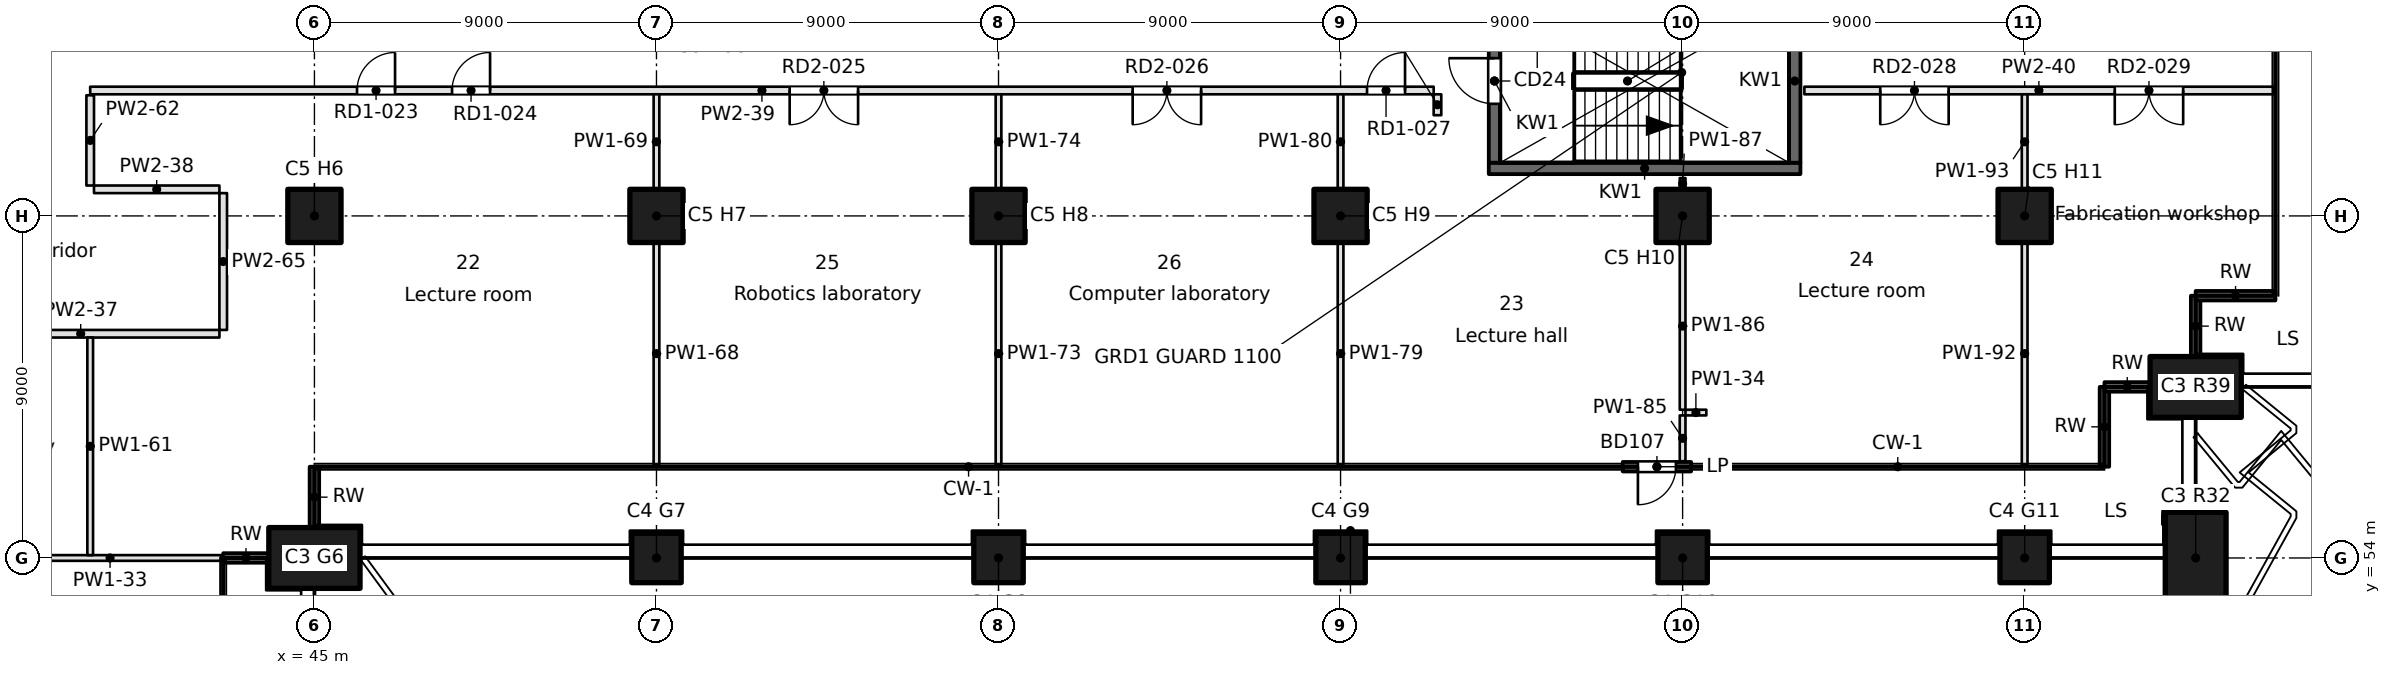
"""IFC4 building model, lengths in metres.
Left out: names, types, materials, properties, quantities, classifications, styles, units other than length and angle.
Written with IfcOpenShell. Run it as: python <this file> out.ifc"""

import sys

from ifc_helpers import new_model, si_unit, direction, frame, frame_2d, origin, origin_2d, place, context, subcontext, project, spatial, rectangle, extrude, element, fill, save


model = new_model("IFC4")
c1 = context("Model", 3, precision=1e-05, world=origin(), true_north=direction((0.0, 1.0)))
c2 = subcontext(c1, "Body", "Model", "MODEL_VIEW")
j1 = project(units=[si_unit("LENGTHUNIT", "METRE"), si_unit("PLANEANGLEUNIT", "RADIAN")], contexts=[c1])
p1 = place(None, origin())
s1 = spatial("IfcSite", under=j1, at=p1, CompositionType="ELEMENT")
p2 = place(p1, origin())
s2 = spatial("IfcBuilding", under=s1, at=p2, CompositionType="ELEMENT")
p3 = place(p2, frame((0.0, 0.0, 58.0)))
s3 = spatial("IfcBuildingStorey", under=s2, at=p3, CompositionType="ELEMENT", Elevation=58.0)
p4 = place(p3, frame((45.0, 54.0, 0.0), z_axis=(0.0, 0.0, 1.0), x_axis=(1.0, 0.0, 0.0)))
e1 = element("IfcColumn", 1, at=p4, inside=s3, PredefinedType="COLUMN", context=c2, shape_type="SweptSolid", body=[
    extrude(rectangle(XDim=2.4, YDim=1.6, at=origin_2d()), origin(), (0.0, 0.0, 1.0), 3.7),
])
for number, where, z_axis, x_axis in (
    (2, (54.0, 54.0, 0.0), (0.0, 0.0, 1.0), (1.0, 0.0, 0.0)),
    (3, (63.0, 54.0, 0.0), (0.0, 0.0, 1.0), (1.0, 0.0, 0.0)),
    (4, (72.0, 54.0, 0.0), (0.0, 0.0, 1.0), (1.0, 0.0, 0.0)),
    (5, (81.0, 54.0, 0.0), (0.0, 0.0, 1.0), (1.0, 0.0, 0.0)),
    (6, (90.0, 54.0, 0.0), (0.0, 0.0, 1.0), (1.0, 0.0, 0.0)),
):
    element("IfcColumn", number, at=place(p3, frame(where, z_axis=z_axis, x_axis=x_axis)), inside=s3, PredefinedType="COLUMN", context=c2, shape_type="SweptSolid", body=[
        extrude(rectangle(XDim=1.3, YDim=1.3, at=origin_2d()), origin(), (0.0, 0.0, 1.0), 3.7),
    ])
for number, where, z_axis, x_axis in (
    (7, (94.5, 54.0, 0.0), (0.0, 0.0, 1.0), (0.0, 1.0, 0.0)),
    (8, (94.5, 58.5, 0.0), (0.0, 0.0, 1.0), (1.0, 0.0, 0.0)),
):
    element("IfcColumn", number, at=place(p3, frame(where, z_axis=z_axis, x_axis=x_axis)), inside=s3, PredefinedType="COLUMN", context=c2, shape_type="SweptSolid", body=[
        extrude(rectangle(XDim=2.4, YDim=1.6, at=origin_2d()), origin(), (0.0, 0.0, 1.0), 3.7),
    ])
for number, where, z_axis, x_axis in (
    (9, (45.0, 63.0, 0.0), (0.0, 0.0, 1.0), (1.0, 0.0, 0.0)),
    (10, (54.0, 63.0, 0.0), (0.0, 0.0, 1.0), (1.0, 0.0, 0.0)),
    (11, (63.0, 63.0, 0.0), (0.0, 0.0, 1.0), (1.0, 0.0, 0.0)),
    (12, (72.0, 63.0, 0.0), (0.0, 0.0, 1.0), (1.0, 0.0, 0.0)),
    (13, (81.0, 63.0, 0.0), (0.0, 0.0, 1.0), (1.0, 0.0, 0.0)),
    (14, (90.0, 63.0, 0.0), (0.0, 0.0, 1.0), (1.0, 0.0, 0.0)),
):
    element("IfcColumn", number, at=place(p3, frame(where, z_axis=z_axis, x_axis=x_axis)), inside=s3, PredefinedType="COLUMN", context=c2, shape_type="SweptSolid", body=[
        extrude(rectangle(XDim=1.4, YDim=1.4, at=origin_2d()), origin(), (0.0, 0.0, 1.0), 3.7),
    ])
p5 = place(p3, frame((42.599, 54.0, 0.0), z_axis=(0.0, 0.0, 1.0), x_axis=(0.999999917344, 0.000406586671, 0.0)))
e15 = element("IfcWall", 15, at=p5, inside=s3, PredefinedType="SOLIDWALL", context=c2, shape_type="SweptSolid", body=[
    extrude(rectangle(XDim=1.201, YDim=0.25, at=frame_2d((0.601, 0.0))), origin(), (0.0, 0.0, 1.0), 3.3),
])
p6 = place(p3, frame((44.999, 54.8, 0.0), z_axis=(0.0, 0.0, 1.0), x_axis=(0.000152508767, 0.999999988371, 0.0)))
e16 = element("IfcWall", 16, at=p6, inside=s3, PredefinedType="SOLIDWALL", context=c2, shape_type="SweptSolid", body=[
    extrude(rectangle(XDim=1.601, YDim=0.25, at=frame_2d((0.8, 0.0))), origin(), (0.0, 0.0, 1.0), 3.3),
])
p7 = place(p3, frame((79.424, 56.401, 0.0), z_axis=(0.0, 0.0, 1.0), x_axis=(1.0, 0.0, 0.0)))
e17 = element("IfcWall", 17, at=p7, inside=s3, PredefinedType="SOLIDWALL", context=c2, shape_type="SweptSolid", body=[
    extrude(rectangle(XDim=1.8, YDim=0.25, at=frame_2d((0.9, 0.0))), origin(), (0.0, 0.0, 1.0), 3.3),
])
p8 = place(p7, frame((0.4, 0.0, 0.0)))
e18 = element("IfcOpeningElement", 18, at=p8, cuts=e17, PredefinedType="OPENING", context=c2, shape_type="SweptSolid", body=[
    extrude(rectangle(XDim=1.0, YDim=2.1, at=frame_2d((0.5, 1.05))), frame((0.0, 0.125, 0.0), z_axis=(0.0, -1.0, 0.0), x_axis=(1.0, 0.0, 0.0)), (0.0, 0.0, 1.0), 0.25),
])
p9 = place(p3, frame((92.099, 56.401, 0.0), z_axis=(0.0, 0.0, 1.0), x_axis=(0.00011626555, 0.999999993241, 0.0)))
e19 = element("IfcWall", 19, at=p9, inside=s3, PredefinedType="SOLIDWALL", context=c2, shape_type="SweptSolid", body=[
    extrude(rectangle(XDim=2.1, YDim=0.25, at=frame_2d((1.05, 0.0))), origin(), (0.0, 0.0, 1.0), 3.3),
])
p10 = place(p3, frame((92.099, 58.501, 0.0), z_axis=(0.0, 0.0, 1.0), x_axis=(1.0, 0.0, 0.0)))
e20 = element("IfcWall", 20, at=p10, inside=s3, PredefinedType="SOLIDWALL", context=c2, shape_type="SweptSolid", body=[
    extrude(rectangle(XDim=1.201, YDim=0.25, at=frame_2d((0.6, 0.0))), origin(), (0.0, 0.0, 1.0), 3.3),
])
p11 = place(p3, frame((94.499, 59.3, 0.0), z_axis=(0.0, 0.0, 1.0), x_axis=(0.00015253203, 0.999999988367, 0.0)))
e21 = element("IfcWall", 21, at=p11, inside=s3, PredefinedType="SOLIDWALL", context=c2, shape_type="SweptSolid", body=[
    extrude(rectangle(XDim=1.601, YDim=0.25, at=frame_2d((0.8, 0.0))), origin(), (0.0, 0.0, 1.0), 3.3),
])
p12 = place(p3, frame((94.499, 60.901, 0.0), z_axis=(0.0, 0.0, 1.0), x_axis=(0.999999993241, 0.00011626555, 0.0)))
e22 = element("IfcWall", 22, at=p12, inside=s3, PredefinedType="SOLIDWALL", context=c2, shape_type="SweptSolid", body=[
    extrude(rectangle(XDim=2.1, YDim=0.25, at=frame_2d((1.05, 0.0))), origin(), (0.0, 0.0, 1.0), 3.3),
])
p13 = place(p3, frame((75.9, 64.25, -0.4), z_axis=(0.0, 0.0, 1.0), x_axis=(1.0, 0.0, 0.0)))
e23 = element("IfcWall", 23, at=p13, inside=s3, PredefinedType="SOLIDWALL", context=c2, shape_type="SweptSolid", body=[
    extrude(rectangle(XDim=8.2, YDim=0.3, at=frame_2d((4.1, 0.0))), origin(), (0.0, 0.0, 1.0), 3.7),
])
p14 = place(p3, frame((76.05, 64.4, -0.4), z_axis=(0.0, 0.0, 1.0), x_axis=(0.0, 1.0, 0.0)))
e24 = element("IfcWall", 24, at=p14, inside=s3, PredefinedType="SOLIDWALL", context=c2, shape_type="SweptSolid", body=[
    extrude(rectangle(XDim=4.3, YDim=0.3, at=frame_2d((2.15, 0.0))), origin(), (0.0, 0.0, 1.0), 3.7),
])
p15 = place(p14, frame((1.55, 0.0, 0.4)))
e25 = element("IfcOpeningElement", 25, at=p15, cuts=e24, PredefinedType="OPENING", context=c2, shape_type="SweptSolid", body=[
    extrude(rectangle(XDim=1.2, YDim=2.1, at=frame_2d((0.6, 1.05))), frame((0.0, 0.15, 0.0), z_axis=(0.0, -1.0, 0.0), x_axis=(1.0, 0.0, 0.0)), (0.0, 0.0, 1.0), 0.3),
])
p16 = place(p3, frame((83.95, 64.4, -0.4), z_axis=(0.0, 0.0, 1.0), x_axis=(0.0, 1.0, 0.0)))
e26 = element("IfcWall", 26, at=p16, inside=s3, PredefinedType="SOLIDWALL", context=c2, shape_type="SweptSolid", body=[
    extrude(rectangle(XDim=4.3, YDim=0.3, at=frame_2d((2.15, 0.0))), origin(), (0.0, 0.0, 1.0), 3.7),
])
p17 = place(p3, frame((36.7, 54.0, 0.0), z_axis=(0.0, 0.0, 1.0), x_axis=(1.0, 0.0, 0.0)))
e27 = element("IfcWall", 27, at=p17, inside=s3, PredefinedType="PARTITIONING", context=c2, shape_type="SweptSolid", body=[
    extrude(rectangle(XDim=5.845, YDim=0.15, at=frame_2d((2.922, 0.0))), origin(), (0.0, 0.0, 1.0), 3.3),
])
p18 = place(p3, frame((81.075, 57.826, 0.0), z_axis=(0.0, 0.0, 1.0), x_axis=(1.0, 0.0, 0.0)))
e28 = element("IfcWall", 28, at=p18, inside=s3, PredefinedType="PARTITIONING", context=c2, shape_type="SweptSolid", body=[
    extrude(rectangle(XDim=0.549, YDim=0.15, at=frame_2d((0.274, 0.0))), origin(), (0.0, 0.0, 1.0), 3.3),
])
p19 = place(p3, frame((42.5, 59.9, 0.0), z_axis=(0.0, 0.0, 1.0), x_axis=(-1.0, 0.0, 0.0)))
e29 = element("IfcWall", 29, at=p19, inside=s3, PredefinedType="PARTITIONING", context=c2, shape_type="SweptSolid", body=[
    extrude(rectangle(XDim=7.3, YDim=0.2, at=frame_2d((3.65, 0.0))), origin(), (0.0, 0.0, 1.0), 3.3),
])
p20 = place(p3, frame((39.2, 63.7, 0.0), z_axis=(0.0, 0.0, 1.0), x_axis=(1.0, 0.0, 0.0)))
e30 = element("IfcWall", 30, at=p20, inside=s3, PredefinedType="PARTITIONING", context=c2, shape_type="SweptSolid", body=[
    extrude(rectangle(XDim=3.3, YDim=0.2, at=frame_2d((1.65, 0.0))), origin(), (0.0, 0.0, 1.0), 3.3),
])
p21 = place(p3, frame((74.45, 66.3, 0.0), z_axis=(0.0, 0.0, 1.0), x_axis=(-1.0, 0.0, 0.0)))
e31 = element("IfcWall", 31, at=p21, inside=s3, PredefinedType="PARTITIONING", context=c2, shape_type="SweptSolid", body=[
    extrude(rectangle(XDim=35.35, YDim=0.2, at=frame_2d((17.675, 0.0))), origin(), (0.0, 0.0, 1.0), 3.3),
])
p22 = place(p21, frame((27.329, 0.0, 0.0)))
e32 = element("IfcOpeningElement", 32, at=p22, cuts=e31, PredefinedType="OPENING", context=c2, shape_type="SweptSolid", body=[
    extrude(rectangle(XDim=1.0, YDim=2.1, at=frame_2d((0.5, 1.05))), frame((0.0, 0.1, 0.0), z_axis=(0.0, -1.0, 0.0), x_axis=(1.0, 0.0, 0.0)), (0.0, 0.0, 1.0), 0.2),
])
p23 = place(p21, frame((24.829, 0.0, 0.0)))
e33 = element("IfcOpeningElement", 33, at=p23, cuts=e31, PredefinedType="OPENING", context=c2, shape_type="SweptSolid", body=[
    extrude(rectangle(XDim=1.0, YDim=2.1, at=frame_2d((0.5, 1.05))), frame((0.0, 0.1, 0.0), z_axis=(0.0, -1.0, 0.0), x_axis=(1.0, 0.0, 0.0)), (0.0, 0.0, 1.0), 0.2),
])
p24 = place(p21, frame((15.146, 0.0, 0.0)))
e34 = element("IfcOpeningElement", 34, at=p24, cuts=e31, PredefinedType="OPENING", context=c2, shape_type="SweptSolid", body=[
    extrude(rectangle(XDim=1.8, YDim=2.1, at=frame_2d((0.9, 1.05))), frame((0.0, 0.1, 0.0), z_axis=(0.0, -1.0, 0.0), x_axis=(1.0, 0.0, 0.0)), (0.0, 0.0, 1.0), 0.2),
])
p25 = place(p21, frame((6.12, 0.0, 0.0)))
e35 = element("IfcOpeningElement", 35, at=p25, cuts=e31, PredefinedType="OPENING", context=c2, shape_type="SweptSolid", body=[
    extrude(rectangle(XDim=1.8, YDim=2.1, at=frame_2d((0.9, 1.05))), frame((0.0, 0.1, 0.0), z_axis=(0.0, -1.0, 0.0), x_axis=(1.0, 0.0, 0.0)), (0.0, 0.0, 1.0), 0.2),
])
p26 = place(p21, frame((0.753, 0.0, 0.0)))
e36 = element("IfcOpeningElement", 36, at=p26, cuts=e31, PredefinedType="OPENING", context=c2, shape_type="SweptSolid", body=[
    extrude(rectangle(XDim=1.0, YDim=2.1, at=frame_2d((0.5, 1.05))), frame((0.0, 0.1, 0.0), z_axis=(0.0, -1.0, 0.0), x_axis=(1.0, 0.0, 0.0)), (0.0, 0.0, 1.0), 0.2),
])
p27 = place(p3, frame((96.545, 66.3, 0.0), z_axis=(0.0, 0.0, 1.0), x_axis=(-1.0, 0.0, 0.0)))
e37 = element("IfcWall", 37, at=p27, inside=s3, PredefinedType="PARTITIONING", context=c2, shape_type="SweptSolid", body=[
    extrude(rectangle(XDim=12.341, YDim=0.2, at=frame_2d((6.17, 0.0))), origin(), (0.0, 0.0, 1.0), 3.3),
])
p28 = place(p27, frame((8.545, 0.0, 0.0)))
e38 = element("IfcOpeningElement", 38, at=p28, cuts=e37, PredefinedType="OPENING", context=c2, shape_type="SweptSolid", body=[
    extrude(rectangle(XDim=1.8, YDim=2.1, at=frame_2d((0.9, 1.05))), frame((0.0, 0.1, 0.0), z_axis=(0.0, -1.0, 0.0), x_axis=(1.0, 0.0, 0.0)), (0.0, 0.0, 1.0), 0.2),
])
p29 = place(p27, frame((2.374, 0.0, 0.0)))
e39 = element("IfcOpeningElement", 39, at=p29, cuts=e37, PredefinedType="OPENING", context=c2, shape_type="SweptSolid", body=[
    extrude(rectangle(XDim=1.8, YDim=2.1, at=frame_2d((0.9, 1.05))), frame((0.0, 0.1, 0.0), z_axis=(0.0, -1.0, 0.0), x_axis=(1.0, 0.0, 0.0)), (0.0, 0.0, 1.0), 0.2),
])
p30 = place(p3, frame((39.1, 59.8, 0.0), z_axis=(0.0, 0.0, 1.0), x_axis=(0.0, -1.0, 0.0)))
e40 = element("IfcWall", 40, at=p30, inside=s3, PredefinedType="PARTITIONING", context=c2, shape_type="SweptSolid", body=[
    extrude(rectangle(XDim=5.725, YDim=0.15, at=frame_2d((2.863, 0.0))), origin(), (0.0, 0.0, 1.0), 3.3),
])
p31 = place(p3, frame((39.1, 66.175, 0.0), z_axis=(0.0, 0.0, 1.0), x_axis=(0.0, -1.0, 0.0)))
e41 = element("IfcWall", 41, at=p31, inside=s3, PredefinedType="PARTITIONING", context=c2, shape_type="SweptSolid", body=[
    extrude(rectangle(XDim=2.375, YDim=0.2, at=frame_2d((1.187, 0.0))), origin(), (0.0, 0.0, 1.0), 3.3),
])
p32 = place(p3, frame((42.6, 63.6, 0.0), z_axis=(0.0, 0.0, 1.0), x_axis=(0.0, -1.0, 0.0)))
e42 = element("IfcWall", 42, at=p32, inside=s3, PredefinedType="PARTITIONING", context=c2, shape_type="SweptSolid", body=[
    extrude(rectangle(XDim=3.6, YDim=0.2, at=frame_2d((1.8, 0.0))), origin(), (0.0, 0.0, 1.0), 3.3),
])
p33 = place(p3, frame((54.0, 62.3, 0.0), z_axis=(0.0, 0.0, 1.0), x_axis=(0.0, -1.0, 0.0)))
e43 = element("IfcWall", 43, at=p33, inside=s3, PredefinedType="PARTITIONING", context=c2, shape_type="SweptSolid", body=[
    extrude(rectangle(XDim=5.845, YDim=0.15, at=frame_2d((2.923, 0.0))), origin(), (0.0, 0.0, 1.0), 3.3),
])
p34 = place(p3, frame((54.0, 66.2, 0.0), z_axis=(0.0, 0.0, 1.0), x_axis=(0.0, -1.0, 0.0)))
e44 = element("IfcWall", 44, at=p34, inside=s3, PredefinedType="PARTITIONING", context=c2, shape_type="SweptSolid", body=[
    extrude(rectangle(XDim=2.5, YDim=0.15, at=frame_2d((1.25, 0.0))), origin(), (0.0, 0.0, 1.0), 3.3),
])
p35 = place(p3, frame((63.0, 62.3, 0.0), z_axis=(0.0, 0.0, 1.0), x_axis=(0.0, -1.0, 0.0)))
e45 = element("IfcWall", 45, at=p35, inside=s3, PredefinedType="PARTITIONING", context=c2, shape_type="SweptSolid", body=[
    extrude(rectangle(XDim=5.845, YDim=0.15, at=frame_2d((2.923, 0.0))), origin(), (0.0, 0.0, 1.0), 3.3),
])
p36 = place(p3, frame((63.0, 66.2, 0.0), z_axis=(0.0, 0.0, 1.0), x_axis=(0.0, -1.0, 0.0)))
e46 = element("IfcWall", 46, at=p36, inside=s3, PredefinedType="PARTITIONING", context=c2, shape_type="SweptSolid", body=[
    extrude(rectangle(XDim=2.5, YDim=0.15, at=frame_2d((1.25, 0.0))), origin(), (0.0, 0.0, 1.0), 3.3),
])
p37 = place(p3, frame((72.0, 62.3, 0.0), z_axis=(0.0, 0.0, 1.0), x_axis=(0.0, -1.0, 0.0)))
e47 = element("IfcWall", 47, at=p37, inside=s3, PredefinedType="PARTITIONING", context=c2, shape_type="SweptSolid", body=[
    extrude(rectangle(XDim=5.845, YDim=0.15, at=frame_2d((2.923, 0.0))), origin(), (0.0, 0.0, 1.0), 3.3),
])
p38 = place(p3, frame((72.0, 66.2, 0.0), z_axis=(0.0, 0.0, 1.0), x_axis=(0.0, -1.0, 0.0)))
e48 = element("IfcWall", 48, at=p38, inside=s3, PredefinedType="PARTITIONING", context=c2, shape_type="SweptSolid", body=[
    extrude(rectangle(XDim=2.5, YDim=0.15, at=frame_2d((1.25, 0.0))), origin(), (0.0, 0.0, 1.0), 3.3),
])
p39 = place(p3, frame((74.55, 65.65, 0.0), z_axis=(0.0, 0.0, 1.0), x_axis=(0.0, 1.0, 0.0)))
e49 = element("IfcWall", 49, at=p39, inside=s3, PredefinedType="PARTITIONING", context=c2, shape_type="SweptSolid", body=[
    extrude(rectangle(XDim=0.55, YDim=0.2, at=frame_2d((0.275, 0.0))), origin(), (0.0, 0.0, 1.0), 3.3),
])
p40 = place(p3, frame((81.0, 57.751, 0.0), z_axis=(0.0, 0.0, 1.0), x_axis=(0.0, -1.0, 0.0)))
e50 = element("IfcWall", 50, at=p40, inside=s3, PredefinedType="PARTITIONING", context=c2, shape_type="SweptSolid", body=[
    extrude(rectangle(XDim=1.205, YDim=0.15, at=frame_2d((0.603, 0.0))), origin(), (0.0, 0.0, 1.0), 3.3),
])
p41 = place(p3, frame((81.0, 62.3, 0.0), z_axis=(0.0, 0.0, 1.0), x_axis=(0.0, -1.0, 0.0)))
e51 = element("IfcWall", 51, at=p41, inside=s3, PredefinedType="PARTITIONING", context=c2, shape_type="SweptSolid", body=[
    extrude(rectangle(XDim=4.399, YDim=0.15, at=frame_2d((2.2, 0.0))), origin(), (0.0, 0.0, 1.0), 3.3),
])
p42 = place(p3, frame((81.0, 63.996, 0.0), z_axis=(0.0, 0.0, 1.0), x_axis=(0.0, -1.0, 0.0)))
e52 = element("IfcWall", 52, at=p42, inside=s3, PredefinedType="PARTITIONING", context=c2, shape_type="SweptSolid", body=[
    extrude(rectangle(XDim=0.296, YDim=0.15, at=frame_2d((0.148, 0.0))), origin(), (0.0, 0.0, 1.0), 3.3),
])
p43 = place(p3, frame((90.0, 62.3, 0.0), z_axis=(0.0, 0.0, 1.0), x_axis=(0.0, -1.0, 0.0)))
e53 = element("IfcWall", 53, at=p43, inside=s3, PredefinedType="PARTITIONING", context=c2, shape_type="SweptSolid", body=[
    extrude(rectangle(XDim=5.845, YDim=0.15, at=frame_2d((2.922, 0.0))), origin(), (0.0, 0.0, 1.0), 3.3),
])
p44 = place(p3, frame((90.0, 66.2, 0.0), z_axis=(0.0, 0.0, 1.0), x_axis=(0.0, -1.0, 0.0)))
e54 = element("IfcWall", 54, at=p44, inside=s3, PredefinedType="PARTITIONING", context=c2, shape_type="SweptSolid", body=[
    extrude(rectangle(XDim=2.5, YDim=0.15, at=frame_2d((1.25, 0.0))), origin(), (0.0, 0.0, 1.0), 3.3),
])
p45 = place(p8, frame((1.0, 0.0, 0.0), z_axis=(0.0, 0.0, 1.0), x_axis=(-1.0, 0.0, 0.0)))
e55 = element("IfcDoor", 55, at=p45, inside=s3, OperationType="SINGLE_SWING_RIGHT", PredefinedType="DOOR", context=c2, shape_type="SweptSolid", body=[
    extrude(rectangle(XDim=1.0, YDim=2.1, at=frame_2d((0.5, 1.05))), frame((0.0, 0.025, 0.0), z_axis=(0.0, -1.0, 0.0), x_axis=(1.0, 0.0, 0.0)), (0.0, 0.0, 1.0), 0.05),
])
fill(e18, e55)
p46 = place(p15, origin())
e56 = element("IfcDoor", 56, at=p46, inside=s3, OperationType="SINGLE_SWING_RIGHT", PredefinedType="DOOR", context=c2, shape_type="SweptSolid", body=[
    extrude(rectangle(XDim=1.2, YDim=2.1, at=frame_2d((0.6, 1.05))), frame((0.0, 0.025, 0.0), z_axis=(0.0, -1.0, 0.0), x_axis=(1.0, 0.0, 0.0)), (0.0, 0.0, 1.0), 0.05),
])
fill(e25, e56)
p47 = place(p22, frame((1.0, 0.0, 0.0), z_axis=(0.0, 0.0, 1.0), x_axis=(-1.0, 0.0, 0.0)))
e57 = element("IfcDoor", 57, at=p47, inside=s3, OperationType="SINGLE_SWING_RIGHT", PredefinedType="DOOR", context=c2, shape_type="SweptSolid", body=[
    extrude(rectangle(XDim=1.0, YDim=2.1, at=frame_2d((0.5, 1.05))), frame((0.0, 0.025, 0.0), z_axis=(0.0, -1.0, 0.0), x_axis=(1.0, 0.0, 0.0)), (0.0, 0.0, 1.0), 0.05),
])
fill(e32, e57)
p48 = place(p23, frame((1.0, 0.0, 0.0), z_axis=(0.0, 0.0, 1.0), x_axis=(-1.0, 0.0, 0.0)))
e58 = element("IfcDoor", 58, at=p48, inside=s3, OperationType="SINGLE_SWING_RIGHT", PredefinedType="DOOR", context=c2, shape_type="SweptSolid", body=[
    extrude(rectangle(XDim=1.0, YDim=2.1, at=frame_2d((0.5, 1.05))), frame((0.0, 0.025, 0.0), z_axis=(0.0, -1.0, 0.0), x_axis=(1.0, 0.0, 0.0)), (0.0, 0.0, 1.0), 0.05),
])
fill(e33, e58)
p49 = place(p24, origin())
e59 = element("IfcDoor", 59, at=p49, inside=s3, OperationType="DOUBLE_DOOR_SINGLE_SWING", PredefinedType="DOOR", context=c2, shape_type="SweptSolid", body=[
    extrude(rectangle(XDim=1.8, YDim=2.1, at=frame_2d((0.9, 1.05))), frame((0.0, 0.025, 0.0), z_axis=(0.0, -1.0, 0.0), x_axis=(1.0, 0.0, 0.0)), (0.0, 0.0, 1.0), 0.05),
])
fill(e34, e59)
p50 = place(p25, origin())
e60 = element("IfcDoor", 60, at=p50, inside=s3, OperationType="DOUBLE_DOOR_SINGLE_SWING", PredefinedType="DOOR", context=c2, shape_type="SweptSolid", body=[
    extrude(rectangle(XDim=1.8, YDim=2.1, at=frame_2d((0.9, 1.05))), frame((0.0, 0.025, 0.0), z_axis=(0.0, -1.0, 0.0), x_axis=(1.0, 0.0, 0.0)), (0.0, 0.0, 1.0), 0.05),
])
fill(e35, e60)
p51 = place(p26, frame((1.0, 0.0, 0.0), z_axis=(0.0, 0.0, 1.0), x_axis=(-1.0, 0.0, 0.0)))
e61 = element("IfcDoor", 61, at=p51, inside=s3, OperationType="SINGLE_SWING_RIGHT", PredefinedType="DOOR", context=c2, shape_type="SweptSolid", body=[
    extrude(rectangle(XDim=1.0, YDim=2.1, at=frame_2d((0.5, 1.05))), frame((0.0, 0.025, 0.0), z_axis=(0.0, -1.0, 0.0), x_axis=(1.0, 0.0, 0.0)), (0.0, 0.0, 1.0), 0.05),
])
fill(e36, e61)
p52 = place(p28, origin())
e62 = element("IfcDoor", 62, at=p52, inside=s3, OperationType="DOUBLE_DOOR_SINGLE_SWING", PredefinedType="DOOR", context=c2, shape_type="SweptSolid", body=[
    extrude(rectangle(XDim=1.8, YDim=2.1, at=frame_2d((0.9, 1.05))), frame((0.0, 0.025, 0.0), z_axis=(0.0, -1.0, 0.0), x_axis=(1.0, 0.0, 0.0)), (0.0, 0.0, 1.0), 0.05),
])
fill(e38, e62)
p53 = place(p29, origin())
e63 = element("IfcDoor", 63, at=p53, inside=s3, OperationType="DOUBLE_DOOR_SINGLE_SWING", PredefinedType="DOOR", context=c2, shape_type="SweptSolid", body=[
    extrude(rectangle(XDim=1.8, YDim=2.1, at=frame_2d((0.9, 1.05))), frame((0.0, 0.025, 0.0), z_axis=(0.0, -1.0, 0.0), x_axis=(1.0, 0.0, 0.0)), (0.0, 0.0, 1.0), 0.05),
])
fill(e39, e63)
save(model, sys.argv[1])
